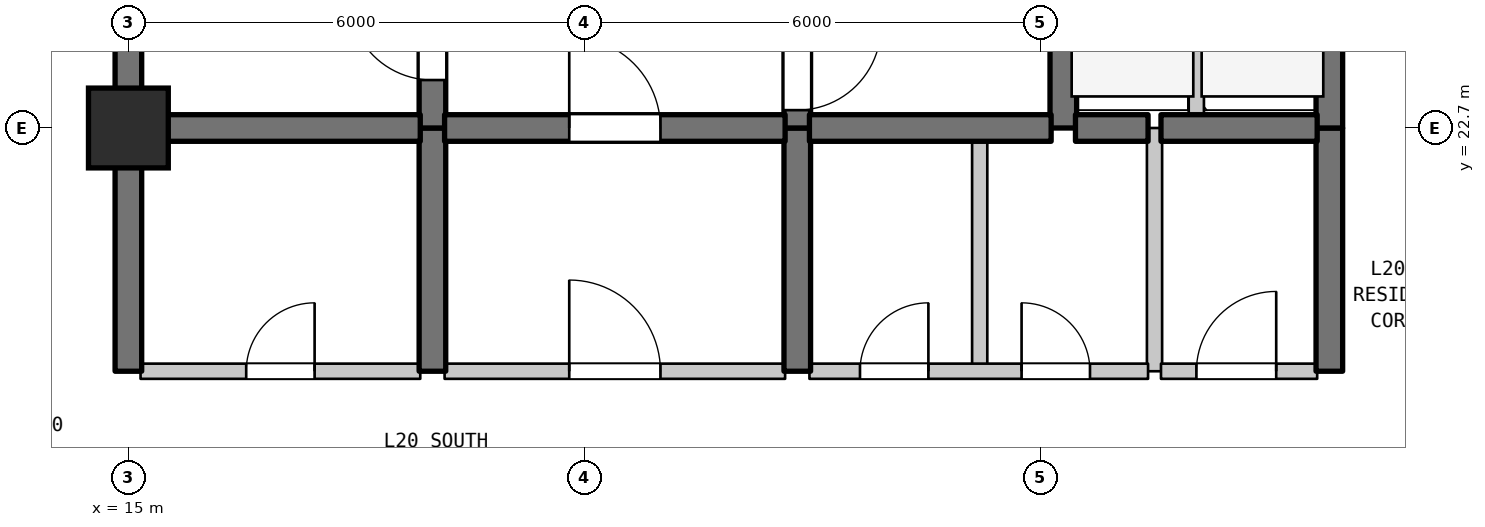
"""IFC4 building model, lengths in metres.
Left out: names, types, materials, properties, quantities, classifications, styles, units other than length and angle.
Written with IfcOpenShell. Run it as: python <this file> out.ifc"""

import sys

from ifc_helpers import new_model, si_unit, direction, frame, frame_2d, origin, origin_2d, place, context, subcontext, project, spatial, rectangle, extrude, element, fill, save


model = new_model("IFC4")
c1 = context("Model", 3, precision=1e-05, world=origin(), true_north=direction((0.0, 1.0)))
c2 = subcontext(c1, "Body", "Model", "MODEL_VIEW")
j1 = project(units=[si_unit("LENGTHUNIT", "METRE"), si_unit("PLANEANGLEUNIT", "RADIAN")], contexts=[c1])
p1 = place(None, origin())
s1 = spatial("IfcSite", under=j1, at=p1, CompositionType="ELEMENT")
p2 = place(p1, origin())
s2 = spatial("IfcBuilding", under=s1, at=p2, CompositionType="ELEMENT")
p3 = place(p2, frame((0.0, 0.0, 86.4)))
s3 = spatial("IfcBuildingStorey", under=s2, at=p3, CompositionType="ELEMENT", Elevation=86.4)
p4 = place(p3, frame((15.0, 22.7, 0.0), z_axis=(0.0, 0.0, 1.0), x_axis=(1.0, 0.0, 0.0)))
e1 = element("IfcColumn", 1, at=p4, inside=s3, PredefinedType="COLUMN", context=c2, shape_type="SweptSolid", body=[
    extrude(rectangle(XDim=1.05, YDim=1.05, at=origin_2d()), origin(), (0.0, 0.0, 1.0), 4.5),
])
p5 = place(p3, frame((15.0, 19.5, 0.0), z_axis=(0.0, 0.0, 1.0), x_axis=(0.0, 1.0, 0.0)))
e2 = element("IfcWall", 2, at=p5, inside=s3, PredefinedType="SHEAR", context=c2, shape_type="SweptSolid", body=[
    extrude(rectangle(XDim=3.2, YDim=0.35, at=frame_2d((1.6, 0.0))), origin(), (0.0, 0.0, 1.0), 4.185),
])
p6 = place(p3, frame((15.0, 22.7, 0.0), z_axis=(0.0, 0.0, 1.0), x_axis=(0.0, 1.0, 0.0)))
e3 = element("IfcWall", 3, at=p6, inside=s3, PredefinedType="SHEAR", context=c2, shape_type="SweptSolid", body=[
    extrude(rectangle(XDim=6.8, YDim=0.35, at=frame_2d((3.4, 0.0))), origin(), (0.0, 0.0, 1.0), 4.185),
])
p7 = place(p3, frame((19.0, 19.5, 0.0), z_axis=(0.0, 0.0, 1.0), x_axis=(0.0, 1.0, 0.0)))
e4 = element("IfcWall", 4, at=p7, inside=s3, PredefinedType="SHEAR", context=c2, shape_type="SweptSolid", body=[
    extrude(rectangle(XDim=3.2, YDim=0.35, at=frame_2d((1.6, 0.0))), origin(), (0.0, 0.0, 1.0), 4.185),
])
p8 = place(p3, frame((19.0, 22.7, 0.0), z_axis=(0.0, 0.0, 1.0), x_axis=(0.0, 1.0, 0.0)))
e5 = element("IfcWall", 5, at=p8, inside=s3, PredefinedType="SHEAR", context=c2, shape_type="SweptSolid", body=[
    extrude(rectangle(XDim=5.5, YDim=0.35, at=frame_2d((2.75, 0.0))), origin(), (0.0, 0.0, 1.0), 4.185),
])
p9 = place(p8, frame((0.631, 0.0, 0.0)))
e6 = element("IfcOpeningElement", 6, at=p9, cuts=e5, PredefinedType="OPENING", context=c2, shape_type="SweptSolid", body=[
    extrude(rectangle(XDim=1.1, YDim=2.15, at=frame_2d((0.55, 1.075))), frame((0.0, 0.185, 0.0), z_axis=(0.0, -1.0, 0.0), x_axis=(1.0, 0.0, 0.0)), (0.0, 0.0, 1.0), 0.37),
])
p10 = place(p3, frame((23.8, 19.5, 0.0), z_axis=(0.0, 0.0, 1.0), x_axis=(0.0, 1.0, 0.0)))
e7 = element("IfcWall", 7, at=p10, inside=s3, PredefinedType="SHEAR", context=c2, shape_type="SweptSolid", body=[
    extrude(rectangle(XDim=3.2, YDim=0.35, at=frame_2d((1.6, 0.0))), origin(), (0.0, 0.0, 1.0), 4.185),
])
p11 = place(p3, frame((23.8, 22.7, 0.0), z_axis=(0.0, 0.0, 1.0), x_axis=(0.0, 1.0, 0.0)))
e8 = element("IfcWall", 8, at=p11, inside=s3, PredefinedType="SHEAR", context=c2, shape_type="SweptSolid", body=[
    extrude(rectangle(XDim=5.5, YDim=0.35, at=frame_2d((2.75, 0.0))), origin(), (0.0, 0.0, 1.0), 4.185),
])
p12 = place(p11, frame((0.235, 0.0, 0.0)))
e9 = element("IfcOpeningElement", 9, at=p12, cuts=e8, PredefinedType="OPENING", context=c2, shape_type="SweptSolid", body=[
    extrude(rectangle(XDim=1.1, YDim=2.15, at=frame_2d((0.55, 1.075))), frame((0.0, 0.185, 0.0), z_axis=(0.0, -1.0, 0.0), x_axis=(1.0, 0.0, 0.0)), (0.0, 0.0, 1.0), 0.37),
])
p13 = place(p3, frame((26.2, 19.5, 0.0), z_axis=(0.0, 0.0, 1.0), x_axis=(0.0, 1.0, 0.0)))
e10 = element("IfcWall", 10, at=p13, inside=s3, PredefinedType="STANDARD", context=c2, shape_type="SweptSolid", body=[
    extrude(rectangle(XDim=3.2, YDim=0.2, at=frame_2d((1.6, 0.0))), origin(), (0.0, 0.0, 1.0), 4.185),
])
p14 = place(p3, frame((27.3, 22.7, 0.0), z_axis=(0.0, 0.0, 1.0), x_axis=(0.0, 1.0, 0.0)))
e11 = element("IfcWall", 11, at=p14, inside=s3, PredefinedType="SHEAR", context=c2, shape_type="SweptSolid", body=[
    extrude(rectangle(XDim=2.9, YDim=0.35, at=frame_2d((1.45, 0.0))), origin(), (0.0, 0.0, 1.0), 4.185),
])
p15 = place(p3, frame((28.5, 19.5, 0.0), z_axis=(0.0, 0.0, 1.0), x_axis=(0.0, 1.0, 0.0)))
e12 = element("IfcWall", 12, at=p15, inside=s3, PredefinedType="STANDARD", context=c2, shape_type="SweptSolid", body=[
    extrude(rectangle(XDim=3.2, YDim=0.2, at=frame_2d((1.6, 0.0))), origin(), (0.0, 0.0, 1.0), 4.185),
])
p16 = place(p3, frame((29.05, 22.7, 0.0), z_axis=(0.0, 0.0, 1.0), x_axis=(0.0, 1.0, 0.0)))
e13 = element("IfcWall", 13, at=p16, inside=s3, PredefinedType="STANDARD", context=c2, shape_type="SweptSolid", body=[
    extrude(rectangle(XDim=2.9, YDim=0.2, at=frame_2d((1.45, 0.0))), origin(), (0.0, 0.0, 1.0), 4.185),
])
p17 = place(p3, frame((30.8, 19.5, 0.0), z_axis=(0.0, 0.0, 1.0), x_axis=(0.0, 1.0, 0.0)))
e14 = element("IfcWall", 14, at=p17, inside=s3, PredefinedType="SHEAR", context=c2, shape_type="SweptSolid", body=[
    extrude(rectangle(XDim=3.2, YDim=0.35, at=frame_2d((1.6, 0.0))), origin(), (0.0, 0.0, 1.0), 4.185),
])
p18 = place(p3, frame((30.8, 22.7, 0.0), z_axis=(0.0, 0.0, 1.0), x_axis=(0.0, 1.0, 0.0)))
e15 = element("IfcWall", 15, at=p18, inside=s3, PredefinedType="SHEAR", context=c2, shape_type="SweptSolid", body=[
    extrude(rectangle(XDim=2.9, YDim=0.35, at=frame_2d((1.45, 0.0))), origin(), (0.0, 0.0, 1.0), 4.185),
])
p19 = place(p3, frame((15.16, 19.5, 0.0), z_axis=(0.0, 0.0, 1.0), x_axis=(1.0, 0.0, 0.0)))
e16 = element("IfcWall", 16, at=p19, inside=s3, PredefinedType="STANDARD", context=c2, shape_type="SweptSolid", body=[
    extrude(rectangle(XDim=3.68, YDim=0.2, at=frame_2d((1.84, 0.0))), origin(), (0.0, 0.0, 1.0), 4.185),
])
p20 = place(p19, frame((1.39, 0.0, 0.0)))
e17 = element("IfcOpeningElement", 17, at=p20, cuts=e16, PredefinedType="OPENING", context=c2, shape_type="SweptSolid", body=[
    extrude(rectangle(XDim=0.9, YDim=2.15, at=frame_2d((0.45, 1.075))), frame((0.0, 0.11, 0.0), z_axis=(0.0, -1.0, 0.0), x_axis=(1.0, 0.0, 0.0)), (0.0, 0.0, 1.0), 0.22),
])
p21 = place(p3, frame((19.16, 19.5, 0.0), z_axis=(0.0, 0.0, 1.0), x_axis=(1.0, 0.0, 0.0)))
e18 = element("IfcWall", 18, at=p21, inside=s3, PredefinedType="STANDARD", context=c2, shape_type="SweptSolid", body=[
    extrude(rectangle(XDim=4.48, YDim=0.2, at=frame_2d((2.24, 0.0))), origin(), (0.0, 0.0, 1.0), 4.185),
])
p22 = place(p21, frame((1.64, 0.0, 0.0)))
e19 = element("IfcOpeningElement", 19, at=p22, cuts=e18, PredefinedType="OPENING", context=c2, shape_type="SweptSolid", body=[
    extrude(rectangle(XDim=1.2, YDim=2.2, at=frame_2d((0.6, 1.1))), frame((0.0, 0.11, 0.0), z_axis=(0.0, -1.0, 0.0), x_axis=(1.0, 0.0, 0.0)), (0.0, 0.0, 1.0), 0.22),
])
p23 = place(p3, frame((23.96, 19.5, 0.0), z_axis=(0.0, 0.0, 1.0), x_axis=(1.0, 0.0, 0.0)))
e20 = element("IfcWall", 20, at=p23, inside=s3, PredefinedType="STANDARD", context=c2, shape_type="SweptSolid", body=[
    extrude(rectangle(XDim=4.455, YDim=0.2, at=frame_2d((2.228, 0.0))), origin(), (0.0, 0.0, 1.0), 4.185),
])
p24 = place(p23, frame((0.665, 0.0, 0.0)))
e21 = element("IfcOpeningElement", 21, at=p24, cuts=e20, PredefinedType="OPENING", context=c2, shape_type="SweptSolid", body=[
    extrude(rectangle(XDim=0.9, YDim=2.15, at=frame_2d((0.45, 1.075))), frame((0.0, 0.11, 0.0), z_axis=(0.0, -1.0, 0.0), x_axis=(1.0, 0.0, 0.0)), (0.0, 0.0, 1.0), 0.22),
])
p25 = place(p23, frame((2.791, 0.0, 0.0)))
e22 = element("IfcOpeningElement", 22, at=p25, cuts=e20, PredefinedType="OPENING", context=c2, shape_type="SweptSolid", body=[
    extrude(rectangle(XDim=0.9, YDim=2.15, at=frame_2d((0.45, 1.075))), frame((0.0, 0.11, 0.0), z_axis=(0.0, -1.0, 0.0), x_axis=(1.0, 0.0, 0.0)), (0.0, 0.0, 1.0), 0.22),
])
p26 = place(p3, frame((28.585, 19.5, 0.0), z_axis=(0.0, 0.0, 1.0), x_axis=(1.0, 0.0, 0.0)))
e23 = element("IfcWall", 23, at=p26, inside=s3, PredefinedType="STANDARD", context=c2, shape_type="SweptSolid", body=[
    extrude(rectangle(XDim=2.055, YDim=0.2, at=frame_2d((1.027, 0.0))), origin(), (0.0, 0.0, 1.0), 4.185),
])
p27 = place(p26, frame((0.466, 0.0, 0.0)))
e24 = element("IfcOpeningElement", 24, at=p27, cuts=e23, PredefinedType="OPENING", context=c2, shape_type="SweptSolid", body=[
    extrude(rectangle(XDim=1.05, YDim=2.15, at=frame_2d((0.525, 1.075))), frame((0.0, 0.11, 0.0), z_axis=(0.0, -1.0, 0.0), x_axis=(1.0, 0.0, 0.0)), (0.0, 0.0, 1.0), 0.22),
])
p28 = place(p3, frame((15.16, 22.7, 0.0), z_axis=(0.0, 0.0, 1.0), x_axis=(1.0, 0.0, 0.0)))
e25 = element("IfcWall", 25, at=p28, inside=s3, PredefinedType="SHEAR", context=c2, shape_type="SweptSolid", body=[
    extrude(rectangle(XDim=3.68, YDim=0.35, at=frame_2d((1.84, 0.0))), origin(), (0.0, 0.0, 1.0), 4.185),
])
p29 = place(p3, frame((19.16, 22.7, 0.0), z_axis=(0.0, 0.0, 1.0), x_axis=(1.0, 0.0, 0.0)))
e26 = element("IfcWall", 26, at=p29, inside=s3, PredefinedType="SHEAR", context=c2, shape_type="SweptSolid", body=[
    extrude(rectangle(XDim=4.48, YDim=0.35, at=frame_2d((2.24, 0.0))), origin(), (0.0, 0.0, 1.0), 4.185),
])
p30 = place(p29, frame((1.64, 0.0, 0.0)))
e27 = element("IfcOpeningElement", 27, at=p30, cuts=e26, PredefinedType="OPENING", context=c2, shape_type="SweptSolid", body=[
    extrude(rectangle(XDim=1.2, YDim=2.2, at=frame_2d((0.6, 1.1))), frame((0.0, 0.185, 0.0), z_axis=(0.0, -1.0, 0.0), x_axis=(1.0, 0.0, 0.0)), (0.0, 0.0, 1.0), 0.37),
])
p31 = place(p3, frame((23.96, 22.7, 0.0), z_axis=(0.0, 0.0, 1.0), x_axis=(1.0, 0.0, 0.0)))
e28 = element("IfcWall", 28, at=p31, inside=s3, PredefinedType="SHEAR", context=c2, shape_type="SweptSolid", body=[
    extrude(rectangle(XDim=3.18, YDim=0.35, at=frame_2d((1.59, 0.0))), origin(), (0.0, 0.0, 1.0), 4.185),
])
p32 = place(p3, frame((27.46, 22.7, 0.0), z_axis=(0.0, 0.0, 1.0), x_axis=(1.0, 0.0, 0.0)))
e29 = element("IfcWall", 29, at=p32, inside=s3, PredefinedType="SHEAR", context=c2, shape_type="SweptSolid", body=[
    extrude(rectangle(XDim=0.955, YDim=0.35, at=frame_2d((0.478, 0.0))), origin(), (0.0, 0.0, 1.0), 4.185),
])
p33 = place(p3, frame((28.585, 22.7, 0.0), z_axis=(0.0, 0.0, 1.0), x_axis=(1.0, 0.0, 0.0)))
e30 = element("IfcWall", 30, at=p33, inside=s3, PredefinedType="SHEAR", context=c2, shape_type="SweptSolid", body=[
    extrude(rectangle(XDim=2.055, YDim=0.35, at=frame_2d((1.027, 0.0))), origin(), (0.0, 0.0, 1.0), 4.185),
])
p34 = place(p9, origin())
e31 = element("IfcDoor", 31, at=p34, inside=s3, OperationType="SINGLE_SWING_RIGHT", PredefinedType="DOOR", context=c2, shape_type="SweptSolid", body=[
    extrude(rectangle(XDim=1.1, YDim=2.15, at=frame_2d((0.55, 1.075))), frame((0.0, 0.025, 0.0), z_axis=(0.0, -1.0, 0.0), x_axis=(1.0, 0.0, 0.0)), (0.0, 0.0, 1.0), 0.05),
])
fill(e6, e31)
p35 = place(p12, frame((1.1, 0.0, 0.0), z_axis=(0.0, 0.0, 1.0), x_axis=(-1.0, 0.0, 0.0)))
e32 = element("IfcDoor", 32, at=p35, inside=s3, OperationType="SINGLE_SWING_RIGHT", PredefinedType="DOOR", context=c2, shape_type="SweptSolid", body=[
    extrude(rectangle(XDim=1.1, YDim=2.15, at=frame_2d((0.55, 1.075))), frame((0.0, 0.025, 0.0), z_axis=(0.0, -1.0, 0.0), x_axis=(1.0, 0.0, 0.0)), (0.0, 0.0, 1.0), 0.05),
])
fill(e9, e32)
p36 = place(p20, origin())
e33 = element("IfcDoor", 33, at=p36, inside=s3, OperationType="SINGLE_SWING_RIGHT", PredefinedType="DOOR", context=c2, shape_type="SweptSolid", body=[
    extrude(rectangle(XDim=0.9, YDim=2.15, at=frame_2d((0.45, 1.075))), frame((0.0, 0.025, 0.0), z_axis=(0.0, -1.0, 0.0), x_axis=(1.0, 0.0, 0.0)), (0.0, 0.0, 1.0), 0.05),
])
fill(e17, e33)
p37 = place(p22, origin())
e34 = element("IfcDoor", 34, at=p37, inside=s3, OperationType="SINGLE_SWING_LEFT", PredefinedType="DOOR", context=c2, shape_type="SweptSolid", body=[
    extrude(rectangle(XDim=1.2, YDim=2.2, at=frame_2d((0.6, 1.1))), frame((0.0, 0.025, 0.0), z_axis=(0.0, -1.0, 0.0), x_axis=(1.0, 0.0, 0.0)), (0.0, 0.0, 1.0), 0.05),
])
fill(e19, e34)
p38 = place(p24, origin())
e35 = element("IfcDoor", 35, at=p38, inside=s3, OperationType="SINGLE_SWING_RIGHT", PredefinedType="DOOR", context=c2, shape_type="SweptSolid", body=[
    extrude(rectangle(XDim=0.9, YDim=2.15, at=frame_2d((0.45, 1.075))), frame((0.0, 0.025, 0.0), z_axis=(0.0, -1.0, 0.0), x_axis=(1.0, 0.0, 0.0)), (0.0, 0.0, 1.0), 0.05),
])
fill(e21, e35)
p39 = place(p25, origin())
e36 = element("IfcDoor", 36, at=p39, inside=s3, OperationType="SINGLE_SWING_LEFT", PredefinedType="DOOR", context=c2, shape_type="SweptSolid", body=[
    extrude(rectangle(XDim=0.9, YDim=2.15, at=frame_2d((0.45, 1.075))), frame((0.0, 0.025, 0.0), z_axis=(0.0, -1.0, 0.0), x_axis=(1.0, 0.0, 0.0)), (0.0, 0.0, 1.0), 0.05),
])
fill(e22, e36)
p40 = place(p27, origin())
e37 = element("IfcDoor", 37, at=p40, inside=s3, OperationType="SINGLE_SWING_RIGHT", PredefinedType="DOOR", context=c2, shape_type="SweptSolid", body=[
    extrude(rectangle(XDim=1.05, YDim=2.15, at=frame_2d((0.525, 1.075))), frame((0.0, 0.025, 0.0), z_axis=(0.0, -1.0, 0.0), x_axis=(1.0, 0.0, 0.0)), (0.0, 0.0, 1.0), 0.05),
])
fill(e24, e37)
p41 = place(p30, origin())
e38 = element("IfcDoor", 38, at=p41, inside=s3, OperationType="SINGLE_SWING_LEFT", PredefinedType="DOOR", context=c2, shape_type="SweptSolid", body=[
    extrude(rectangle(XDim=1.2, YDim=2.2, at=frame_2d((0.6, 1.1))), frame((0.0, 0.025, 0.0), z_axis=(0.0, -1.0, 0.0), x_axis=(1.0, 0.0, 0.0)), (0.0, 0.0, 1.0), 0.05),
])
fill(e27, e38)
save(model, sys.argv[1])
